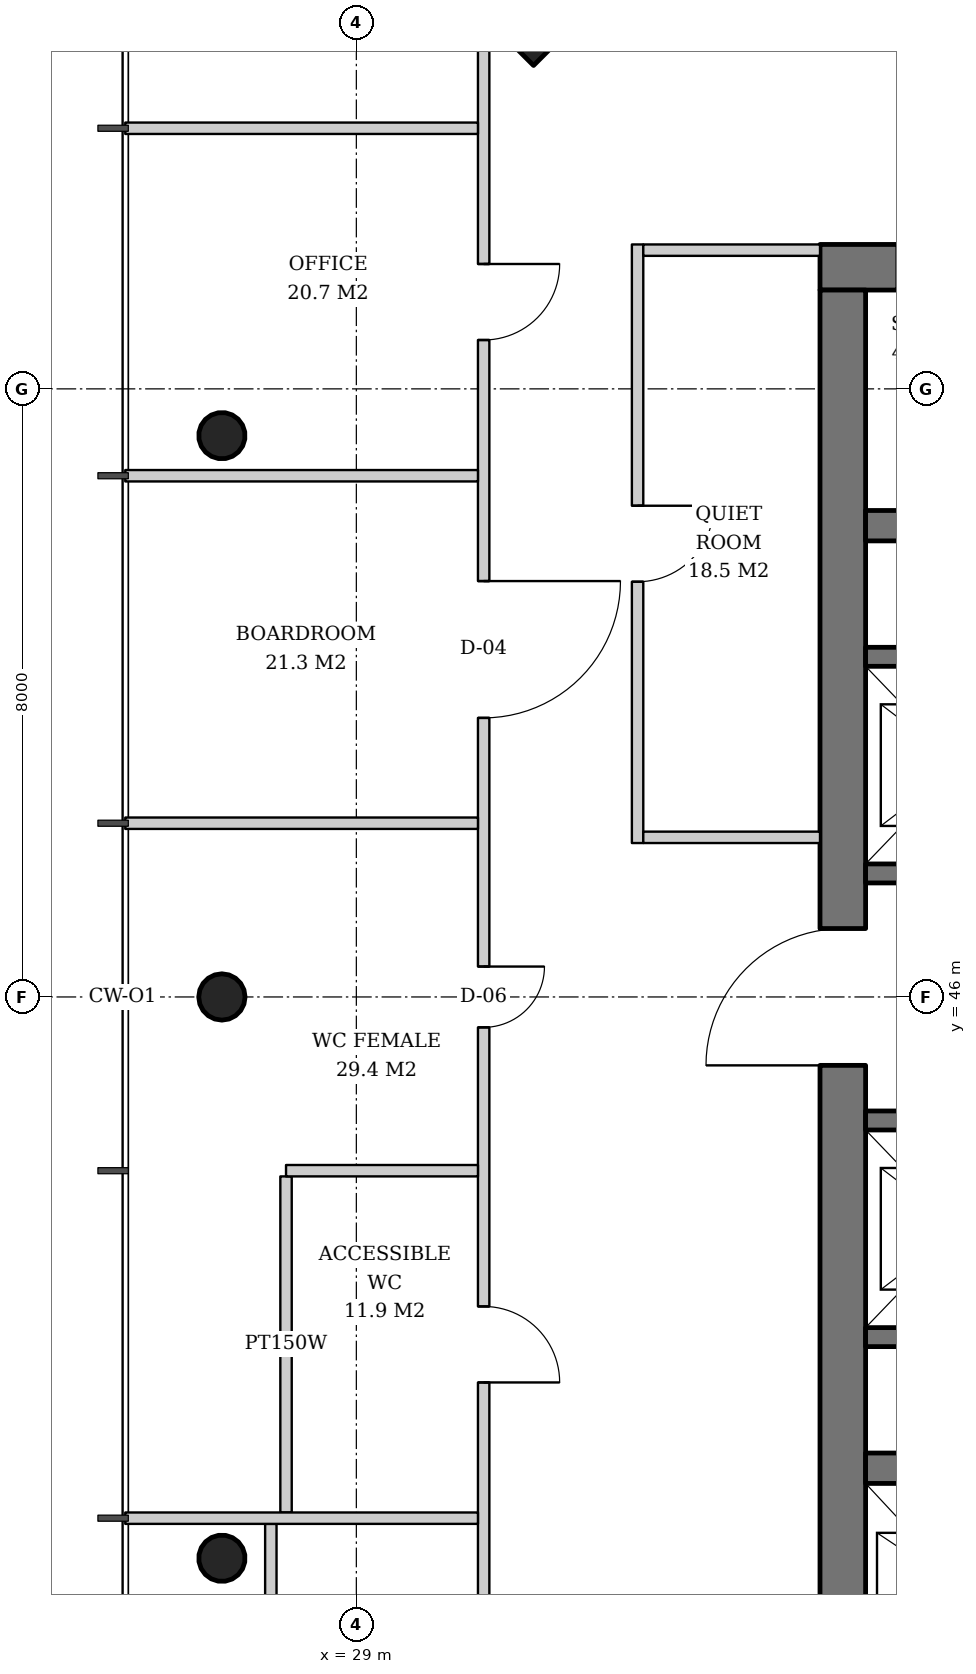
"""IFC4 building model, lengths in metres.
Left out: names, types, materials, properties, quantities, classifications, styles, units other than length and angle.
Written with IfcOpenShell. Run it as: python <this file> out.ifc"""

import sys

from ifc_helpers import new_model, si_unit, direction, frame, frame_2d, origin, origin_2d, place, context, subcontext, project, spatial, rectangle, hollow_circle, extrude, element, fill, save


model = new_model("IFC4")
c1 = context("Model", 3, precision=1e-05, world=origin(), true_north=direction((0.0, 1.0)))
c2 = subcontext(c1, "Body", "Model", "MODEL_VIEW")
j1 = project(units=[si_unit("LENGTHUNIT", "METRE"), si_unit("PLANEANGLEUNIT", "RADIAN")], contexts=[c1])
p1 = place(None, origin())
s1 = spatial("IfcSite", under=j1, at=p1, CompositionType="ELEMENT")
p2 = place(p1, origin())
s2 = spatial("IfcBuilding", under=s1, at=p2, CompositionType="ELEMENT")
p3 = place(p2, frame((0.0, 0.0, 214.8)))
s3 = spatial("IfcBuildingStorey", under=s2, at=p3, CompositionType="ELEMENT", Elevation=214.8)
p4 = place(p3, frame((31.293, 59.707, 0.0), z_axis=(0.031898107953, -0.031898107953, 0.998981992539), x_axis=(0.707106781187, 0.707106781187, 0.0)))
e1 = element("IfcColumn", 1, at=p4, inside=s3, PredefinedType="COLUMN", context=c2, shape_type="SweptSolid", body=[
    extrude(rectangle(XDim=2.0, YDim=2.0, at=origin_2d()), origin(), (0.0, 0.0, 1.0), 3.804),
])
p5 = place(p3, frame((27.193, 53.404, 0.0), z_axis=(0.031910269556, -0.015987237665, 0.999362868496), x_axis=(0.447933021895, 0.894067115991, 0.0)))
e2 = element("IfcColumn", 2, at=p5, inside=s3, PredefinedType="COLUMN", context=c2, shape_type="SweptSolid", body=[
    extrude(hollow_circle(Radius=0.305, WallThickness=0.025, at=origin_2d()), origin(), (0.0, 0.0, 1.0), 3.802),
])
p6 = place(p3, frame((27.193, 46.0, 0.0), z_axis=(0.031914348339, 0.0, 0.999490607445), x_axis=(0.0, 1.0, 0.0)))
e3 = element("IfcColumn", 3, at=p6, inside=s3, PredefinedType="COLUMN", context=c2, shape_type="SweptSolid", body=[
    extrude(hollow_circle(Radius=0.305, WallThickness=0.025, at=origin_2d()), origin(), (0.0, 0.0, 1.0), 3.802),
])
p7 = place(p3, frame((27.193, 38.596, 0.0), z_axis=(0.031910269556, 0.015987237665, 0.999362868496), x_axis=(-0.447933021895, 0.894067115991, 0.0)))
e4 = element("IfcColumn", 4, at=p7, inside=s3, PredefinedType="COLUMN", context=c2, shape_type="SweptSolid", body=[
    extrude(hollow_circle(Radius=0.305, WallThickness=0.025, at=origin_2d()), origin(), (0.0, 0.0, 1.0), 3.802),
])
p8 = place(p3, frame((35.1, 55.6, 0.0), z_axis=(0.0, 0.0, 1.0), x_axis=(1.0, 0.0, 0.0)))
e5 = element("IfcWall", 5, at=p8, inside=s3, PredefinedType="SHEAR", context=c2, shape_type="SweptSolid", body=[
    extrude(rectangle(XDim=19.8, YDim=0.6, at=frame_2d((9.9, 0.0))), origin(), (0.0, 0.0, 1.0), 3.8),
])
p9 = place(p8, frame((14.54, 0.0, 0.0)))
e6 = element("IfcOpeningElement", 6, at=p9, cuts=e5, PredefinedType="OPENING", context=c2, shape_type="SweptSolid", body=[
    extrude(rectangle(XDim=1.0, YDim=2.1, at=frame_2d((0.5, 1.05))), frame((0.0, 0.31, 0.0), z_axis=(0.0, -1.0, 0.0), x_axis=(1.0, 0.0, 0.0)), (0.0, 0.0, 1.0), 0.62),
])
p10 = place(p8, frame((1.024, 0.0, 0.0)))
e7 = element("IfcOpeningElement", 7, at=p10, cuts=e5, PredefinedType="OPENING", context=c2, shape_type="SweptSolid", body=[
    extrude(rectangle(XDim=1.0, YDim=2.1, at=frame_2d((0.5, 1.05))), frame((0.0, 0.31, 0.0), z_axis=(0.0, -1.0, 0.0), x_axis=(1.0, 0.0, 0.0)), (0.0, 0.0, 1.0), 0.62),
])
p11 = place(p8, frame((3.262, 0.0, 0.0)))
e8 = element("IfcOpeningElement", 8, at=p11, cuts=e5, PredefinedType="OPENING", context=c2, shape_type="SweptSolid", body=[
    extrude(rectangle(XDim=1.0, YDim=2.1, at=frame_2d((0.5, 1.05))), frame((0.0, 0.31, 0.0), z_axis=(0.0, -1.0, 0.0), x_axis=(1.0, 0.0, 0.0)), (0.0, 0.0, 1.0), 0.62),
])
p12 = place(p3, frame((35.4, 36.7, 0.0), z_axis=(0.0, 0.0, 1.0), x_axis=(0.0, 1.0, 0.0)))
e9 = element("IfcWall", 9, at=p12, inside=s3, PredefinedType="SHEAR", context=c2, shape_type="SweptSolid", body=[
    extrude(rectangle(XDim=18.6, YDim=0.6, at=frame_2d((9.3, 0.0))), origin(), (0.0, 0.0, 1.0), 3.8),
])
p13 = place(p12, frame((8.4, 0.0, 0.0)))
e10 = element("IfcOpeningElement", 10, at=p13, cuts=e9, PredefinedType="OPENING", context=c2, shape_type="SweptSolid", body=[
    extrude(rectangle(XDim=1.8, YDim=2.4, at=frame_2d((0.9, 1.2))), frame((0.0, 0.31, 0.0), z_axis=(0.0, -1.0, 0.0), x_axis=(1.0, 0.0, 0.0)), (0.0, 0.0, 1.0), 0.62),
])
for number, where, z_axis, x_axis in (
    (11, (35.7, 39.8, 0.0), (0.0, 0.0, 1.0), (1.0, 0.0, 0.0)),
    (12, (35.7, 52.2, 0.0), (0.0, 0.0, 1.0), (1.0, 0.0, 0.0)),
):
    element("IfcWall", number, at=place(p3, frame(where, z_axis=z_axis, x_axis=x_axis)), inside=s3, PredefinedType="SHEAR", context=c2, shape_type="SweptSolid", body=[
        extrude(rectangle(XDim=18.6, YDim=0.4, at=frame_2d((9.3, 0.0))), origin(), (0.0, 0.0, 1.0), 3.8),
    ])
p14 = place(p3, frame((35.7, 50.475, 0.0), z_axis=(0.0, 0.0, 1.0), x_axis=(1.0, 0.0, 0.0)))
e13 = element("IfcWall", 13, at=p14, inside=s3, PredefinedType="SHEAR", context=c2, shape_type="SweptSolid", body=[
    extrude(rectangle(XDim=11.0, YDim=0.25, at=frame_2d((5.5, 0.0))), origin(), (0.0, 0.0, 1.0), 3.8),
])
p15 = place(p3, frame((35.7, 47.625, 0.0), z_axis=(0.0, 0.0, 1.0), x_axis=(1.0, 0.0, 0.0)))
e14 = element("IfcWall", 14, at=p15, inside=s3, PredefinedType="SHEAR", context=c2, shape_type="SweptSolid", body=[
    extrude(rectangle(XDim=12.83, YDim=0.25, at=frame_2d((6.415, 0.0))), origin(), (0.0, 0.0, 1.0), 3.8),
])
p16 = place(p15, frame((0.7, 0.0, 0.0)))
e15 = element("IfcOpeningElement", 15, at=p16, cuts=e14, PredefinedType="OPENING", context=c2, shape_type="SweptSolid", body=[
    extrude(rectangle(XDim=1.1, YDim=2.2, at=frame_2d((0.55, 1.1))), frame((0.0, 0.135, 0.0), z_axis=(0.0, -1.0, 0.0), x_axis=(1.0, 0.0, 0.0)), (0.0, 0.0, 1.0), 0.27),
])
p17 = place(p15, frame((3.45, 0.0, 0.0)))
e16 = element("IfcOpeningElement", 16, at=p17, cuts=e14, PredefinedType="OPENING", context=c2, shape_type="SweptSolid", body=[
    extrude(rectangle(XDim=1.1, YDim=2.2, at=frame_2d((0.55, 1.1))), frame((0.0, 0.135, 0.0), z_axis=(0.0, -1.0, 0.0), x_axis=(1.0, 0.0, 0.0)), (0.0, 0.0, 1.0), 0.27),
])
p18 = place(p15, frame((6.2, 0.0, 0.0)))
e17 = element("IfcOpeningElement", 17, at=p18, cuts=e14, PredefinedType="OPENING", context=c2, shape_type="SweptSolid", body=[
    extrude(rectangle(XDim=1.1, YDim=2.2, at=frame_2d((0.55, 1.1))), frame((0.0, 0.135, 0.0), z_axis=(0.0, -1.0, 0.0), x_axis=(1.0, 0.0, 0.0)), (0.0, 0.0, 1.0), 0.27),
])
p19 = place(p15, frame((9.0, 0.0, 0.0)))
e18 = element("IfcOpeningElement", 18, at=p19, cuts=e14, PredefinedType="OPENING", context=c2, shape_type="SweptSolid", body=[
    extrude(rectangle(XDim=1.0, YDim=2.1, at=frame_2d((0.5, 1.05))), frame((0.0, 0.135, 0.0), z_axis=(0.0, -1.0, 0.0), x_axis=(1.0, 0.0, 0.0)), (0.0, 0.0, 1.0), 0.27),
])
p20 = place(p15, frame((11.515, 0.0, 0.0)))
e19 = element("IfcOpeningElement", 19, at=p20, cuts=e14, PredefinedType="OPENING", context=c2, shape_type="SweptSolid", body=[
    extrude(rectangle(XDim=0.8, YDim=2.0, at=frame_2d((0.4, 1.0))), frame((0.0, 0.135, 0.0), z_axis=(0.0, -1.0, 0.0), x_axis=(1.0, 0.0, 0.0)), (0.0, 0.0, 1.0), 0.27),
])
p21 = place(p3, frame((35.7, 41.525, 0.0), z_axis=(0.0, 0.0, 1.0), x_axis=(1.0, 0.0, 0.0)))
e20 = element("IfcWall", 20, at=p21, inside=s3, PredefinedType="SHEAR", context=c2, shape_type="SweptSolid", body=[
    extrude(rectangle(XDim=11.0, YDim=0.25, at=frame_2d((5.5, 0.0))), origin(), (0.0, 0.0, 1.0), 3.8),
])
p22 = place(p3, frame((35.7, 44.375, 0.0), z_axis=(0.0, 0.0, 1.0), x_axis=(1.0, 0.0, 0.0)))
e21 = element("IfcWall", 21, at=p22, inside=s3, PredefinedType="SHEAR", context=c2, shape_type="SweptSolid", body=[
    extrude(rectangle(XDim=12.83, YDim=0.25, at=frame_2d((6.415, 0.0))), origin(), (0.0, 0.0, 1.0), 3.8),
])
p23 = place(p22, frame((0.7, 0.0, 0.0)))
e22 = element("IfcOpeningElement", 22, at=p23, cuts=e21, PredefinedType="OPENING", context=c2, shape_type="SweptSolid", body=[
    extrude(rectangle(XDim=1.1, YDim=2.2, at=frame_2d((0.55, 1.1))), frame((0.0, 0.135, 0.0), z_axis=(0.0, -1.0, 0.0), x_axis=(1.0, 0.0, 0.0)), (0.0, 0.0, 1.0), 0.27),
])
p24 = place(p22, frame((3.45, 0.0, 0.0)))
e23 = element("IfcOpeningElement", 23, at=p24, cuts=e21, PredefinedType="OPENING", context=c2, shape_type="SweptSolid", body=[
    extrude(rectangle(XDim=1.1, YDim=2.2, at=frame_2d((0.55, 1.1))), frame((0.0, 0.135, 0.0), z_axis=(0.0, -1.0, 0.0), x_axis=(1.0, 0.0, 0.0)), (0.0, 0.0, 1.0), 0.27),
])
p25 = place(p22, frame((6.2, 0.0, 0.0)))
e24 = element("IfcOpeningElement", 24, at=p25, cuts=e21, PredefinedType="OPENING", context=c2, shape_type="SweptSolid", body=[
    extrude(rectangle(XDim=1.1, YDim=2.2, at=frame_2d((0.55, 1.1))), frame((0.0, 0.135, 0.0), z_axis=(0.0, -1.0, 0.0), x_axis=(1.0, 0.0, 0.0)), (0.0, 0.0, 1.0), 0.27),
])
p26 = place(p22, frame((9.0, 0.0, 0.0)))
e25 = element("IfcOpeningElement", 25, at=p26, cuts=e21, PredefinedType="OPENING", context=c2, shape_type="SweptSolid", body=[
    extrude(rectangle(XDim=1.0, YDim=2.1, at=frame_2d((0.5, 1.05))), frame((0.0, 0.135, 0.0), z_axis=(0.0, -1.0, 0.0), x_axis=(1.0, 0.0, 0.0)), (0.0, 0.0, 1.0), 0.27),
])
p27 = place(p22, frame((11.515, 0.0, 0.0)))
e26 = element("IfcOpeningElement", 26, at=p27, cuts=e21, PredefinedType="OPENING", context=c2, shape_type="SweptSolid", body=[
    extrude(rectangle(XDim=0.8, YDim=2.0, at=frame_2d((0.4, 1.0))), frame((0.0, 0.135, 0.0), z_axis=(0.0, -1.0, 0.0), x_axis=(1.0, 0.0, 0.0)), (0.0, 0.0, 1.0), 0.27),
])
p28 = place(p3, frame((32.7, 55.9, 0.0), z_axis=(0.0, 0.0, 1.0), x_axis=(0.0, -1.0, 0.0)))
e27 = element("IfcWall", 27, at=p28, inside=s3, PredefinedType="PARTITIONING", context=c2, shape_type="SweptSolid", body=[
    extrude(rectangle(XDim=7.875, YDim=0.15, at=frame_2d((3.938, 0.0))), origin(), (0.0, 0.0, 1.0), 2.867),
])
p29 = place(p28, frame((3.438, 0.0, 0.0)))
e28 = element("IfcOpeningElement", 28, at=p29, cuts=e27, PredefinedType="OPENING", context=c2, shape_type="SweptSolid", body=[
    extrude(rectangle(XDim=1.0, YDim=2.1, at=frame_2d((0.5, 1.05))), frame((0.0, 0.085, 0.0), z_axis=(0.0, -1.0, 0.0), x_axis=(1.0, 0.0, 0.0)), (0.0, 0.0, 1.0), 0.17),
])
p30 = place(p3, frame((35.1, 55.825, 0.0), z_axis=(0.0, 0.0, 1.0), x_axis=(-1.0, 0.0, 0.0)))
e29 = element("IfcWall", 29, at=p30, inside=s3, PredefinedType="PARTITIONING", context=c2, shape_type="SweptSolid", body=[
    extrude(rectangle(XDim=2.325, YDim=0.15, at=frame_2d((1.163, 0.0))), origin(), (0.0, 0.0, 1.0), 2.92),
])
p31 = place(p3, frame((35.1, 48.1, 0.0), z_axis=(0.0, 0.0, 1.0), x_axis=(-1.0, 0.0, 0.0)))
e30 = element("IfcWall", 30, at=p31, inside=s3, PredefinedType="PARTITIONING", context=c2, shape_type="SweptSolid", body=[
    extrude(rectangle(XDim=2.325, YDim=0.15, at=frame_2d((1.163, 0.0))), origin(), (0.0, 0.0, 1.0), 3.62),
])
p32 = place(p3, frame((28.075, 43.639, 0.0), z_axis=(0.0, 0.0, 1.0), x_axis=(0.0, -1.0, 0.0)))
e31 = element("IfcWall", 31, at=p32, inside=s3, PredefinedType="PARTITIONING", context=c2, shape_type="SweptSolid", body=[
    extrude(rectangle(XDim=4.422, YDim=0.15, at=frame_2d((2.211, 0.0))), origin(), (0.0, 0.0, 1.0), 2.867),
])
p33 = place(p3, frame((27.875, 39.068, 0.0), z_axis=(0.0, 0.0, 1.0), x_axis=(0.0, -1.0, 0.0)))
e32 = element("IfcWall", 32, at=p33, inside=s3, PredefinedType="PARTITIONING", context=c2, shape_type="SweptSolid", body=[
    extrude(rectangle(XDim=4.421, YDim=0.15, at=frame_2d((2.211, 0.0))), origin(), (0.0, 0.0, 1.0), 2.867),
])
p34 = place(p3, frame((30.675, 58.836, 0.0), z_axis=(0.0, 0.0, 1.0), x_axis=(0.0, -1.0, 0.0)))
e33 = element("IfcWall", 33, at=p34, inside=s3, PredefinedType="PARTITIONING", context=c2, shape_type="SweptSolid", body=[
    extrude(rectangle(XDim=25.671, YDim=0.15, at=frame_2d((12.836, 0.0))), origin(), (0.0, 0.0, 1.0), 2.867),
])
p35 = place(p34, frame((3.193, 0.0, 0.0)))
e34 = element("IfcOpeningElement", 34, at=p35, cuts=e33, PredefinedType="OPENING", context=c2, shape_type="SweptSolid", body=[
    extrude(rectangle(XDim=1.0, YDim=2.1, at=frame_2d((0.5, 1.05))), frame((0.0, 0.085, 0.0), z_axis=(0.0, -1.0, 0.0), x_axis=(1.0, 0.0, 0.0)), (0.0, 0.0, 1.0), 0.17),
])
p36 = place(p34, frame((7.364, 0.0, 0.0)))
e35 = element("IfcOpeningElement", 35, at=p36, cuts=e33, PredefinedType="OPENING", context=c2, shape_type="SweptSolid", body=[
    extrude(rectangle(XDim=1.8, YDim=2.4, at=frame_2d((0.9, 1.2))), frame((0.0, 0.085, 0.0), z_axis=(0.0, -1.0, 0.0), x_axis=(1.0, 0.0, 0.0)), (0.0, 0.0, 1.0), 0.17),
])
p37 = place(p34, frame((12.436, 0.0, 0.0)))
e36 = element("IfcOpeningElement", 36, at=p37, cuts=e33, PredefinedType="OPENING", context=c2, shape_type="SweptSolid", body=[
    extrude(rectangle(XDim=0.8, YDim=2.1, at=frame_2d((0.4, 1.05))), frame((0.0, 0.085, 0.0), z_axis=(0.0, -1.0, 0.0), x_axis=(1.0, 0.0, 0.0)), (0.0, 0.0, 1.0), 0.17),
])
p38 = place(p34, frame((16.907, 0.0, 0.0)))
e37 = element("IfcOpeningElement", 37, at=p38, cuts=e33, PredefinedType="OPENING", context=c2, shape_type="SweptSolid", body=[
    extrude(rectangle(XDim=1.0, YDim=2.1, at=frame_2d((0.5, 1.05))), frame((0.0, 0.085, 0.0), z_axis=(0.0, -1.0, 0.0), x_axis=(1.0, 0.0, 0.0)), (0.0, 0.0, 1.0), 0.17),
])
p39 = place(p34, frame((21.579, 0.0, 0.0)))
e38 = element("IfcOpeningElement", 38, at=p39, cuts=e33, PredefinedType="OPENING", context=c2, shape_type="SweptSolid", body=[
    extrude(rectangle(XDim=0.8, YDim=2.1, at=frame_2d((0.4, 1.05))), frame((0.0, 0.085, 0.0), z_axis=(0.0, -1.0, 0.0), x_axis=(1.0, 0.0, 0.0)), (0.0, 0.0, 1.0), 0.17),
])
for number, where, z_axis, x_axis in (
    (39, (30.6, 57.428, 0.0), (0.0, 0.0, 1.0), (-1.0, 0.0, 0.0)),
    (40, (30.6, 52.857, 0.0), (0.0, 0.0, 1.0), (-1.0, 0.0, 0.0)),
    (41, (30.6, 48.286, 0.0), (0.0, 0.0, 1.0), (-1.0, 0.0, 0.0)),
):
    element("IfcWall", number, at=place(p3, frame(where, z_axis=z_axis, x_axis=x_axis)), inside=s3, PredefinedType="PARTITIONING", context=c2, shape_type="SweptSolid", body=[
        extrude(rectangle(XDim=4.64, YDim=0.15, at=frame_2d((2.32, 0.0))), origin(), (0.0, 0.0, 1.0), 3.12),
    ])
p40 = place(p3, frame((30.6, 43.714, 0.0), z_axis=(0.0, 0.0, 1.0), x_axis=(-1.0, 0.0, 0.0)))
e42 = element("IfcWall", 42, at=p40, inside=s3, PredefinedType="PARTITIONING", context=c2, shape_type="SweptSolid", body=[
    extrude(rectangle(XDim=2.525, YDim=0.15, at=frame_2d((1.263, 0.0))), origin(), (0.0, 0.0, 1.0), 3.62),
])
p41 = place(p3, frame((30.6, 39.143, 0.0), z_axis=(0.0, 0.0, 1.0), x_axis=(-1.0, 0.0, 0.0)))
e43 = element("IfcWall", 43, at=p41, inside=s3, PredefinedType="PARTITIONING", context=c2, shape_type="SweptSolid", body=[
    extrude(rectangle(XDim=4.64, YDim=0.15, at=frame_2d((2.32, 0.0))), origin(), (0.0, 0.0, 1.0), 3.12),
])
p42 = place(p13, origin())
e44 = element("IfcDoor", 44, at=p42, inside=s3, OperationType="DOUBLE_DOOR_SINGLE_SWING", PredefinedType="DOOR", context=c2, shape_type="SweptSolid", body=[
    extrude(rectangle(XDim=1.8, YDim=2.4, at=frame_2d((0.9, 1.2))), frame((0.0, 0.025, 0.0), z_axis=(0.0, -1.0, 0.0), x_axis=(1.0, 0.0, 0.0)), (0.0, 0.0, 1.0), 0.05),
])
fill(e10, e44)
p43 = place(p29, origin())
e45 = element("IfcDoor", 45, at=p43, inside=s3, OperationType="SINGLE_SWING_LEFT", PredefinedType="DOOR", context=c2, shape_type="SweptSolid", body=[
    extrude(rectangle(XDim=1.0, YDim=2.1, at=frame_2d((0.5, 1.05))), frame((0.0, 0.025, 0.0), z_axis=(0.0, -1.0, 0.0), x_axis=(1.0, 0.0, 0.0)), (0.0, 0.0, 1.0), 0.05),
])
fill(e28, e45)
p44 = place(p35, origin())
e46 = element("IfcDoor", 46, at=p44, inside=s3, OperationType="SINGLE_SWING_LEFT", PredefinedType="DOOR", context=c2, shape_type="SweptSolid", body=[
    extrude(rectangle(XDim=1.0, YDim=2.1, at=frame_2d((0.5, 1.05))), frame((0.0, 0.025, 0.0), z_axis=(0.0, -1.0, 0.0), x_axis=(1.0, 0.0, 0.0)), (0.0, 0.0, 1.0), 0.05),
])
fill(e34, e46)
p45 = place(p36, origin())
e47 = element("IfcDoor", 47, at=p45, inside=s3, OperationType="DOUBLE_DOOR_SINGLE_SWING", PredefinedType="DOOR", context=c2, shape_type="SweptSolid", body=[
    extrude(rectangle(XDim=1.8, YDim=2.4, at=frame_2d((0.9, 1.2))), frame((0.0, 0.025, 0.0), z_axis=(0.0, -1.0, 0.0), x_axis=(1.0, 0.0, 0.0)), (0.0, 0.0, 1.0), 0.05),
])
fill(e35, e47)
p46 = place(p37, origin())
e48 = element("IfcDoor", 48, at=p46, inside=s3, OperationType="SINGLE_SWING_LEFT", PredefinedType="DOOR", context=c2, shape_type="SweptSolid", body=[
    extrude(rectangle(XDim=0.8, YDim=2.1, at=frame_2d((0.4, 1.05))), frame((0.0, 0.025, 0.0), z_axis=(0.0, -1.0, 0.0), x_axis=(1.0, 0.0, 0.0)), (0.0, 0.0, 1.0), 0.05),
])
fill(e36, e48)
p47 = place(p38, origin())
e49 = element("IfcDoor", 49, at=p47, inside=s3, OperationType="SINGLE_SWING_RIGHT", PredefinedType="DOOR", context=c2, shape_type="SweptSolid", body=[
    extrude(rectangle(XDim=1.0, YDim=2.1, at=frame_2d((0.5, 1.05))), frame((0.0, 0.025, 0.0), z_axis=(0.0, -1.0, 0.0), x_axis=(1.0, 0.0, 0.0)), (0.0, 0.0, 1.0), 0.05),
])
fill(e37, e49)
save(model, sys.argv[1])
